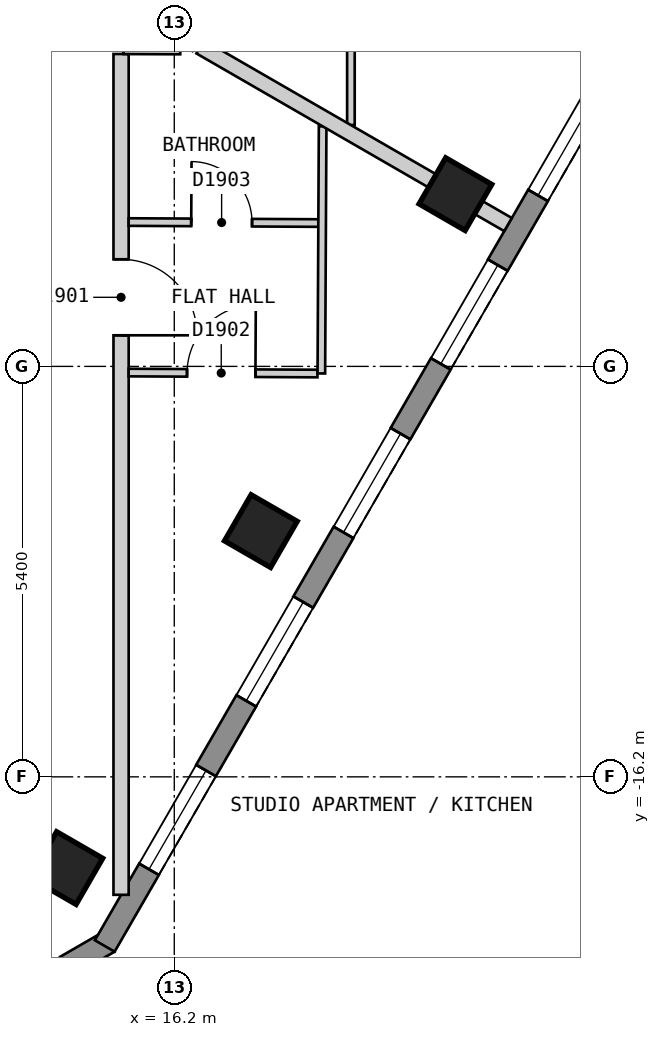
"""IFC4 building model, lengths in metres.
Left out: names, types, materials, properties, quantities, classifications, styles, units other than length and angle.
Written with IfcOpenShell. Run it as: python <this file> out.ifc"""

import sys

from ifc_helpers import new_model, si_unit, direction, frame, frame_2d, origin, origin_2d, place, context, subcontext, project, spatial, polyline, rectangle, outline, extrude, element, fill, save


model = new_model("IFC4")
c1 = context("Model", 3, precision=1e-05, world=origin(), true_north=direction((0.0, 1.0)))
c2 = subcontext(c1, "Body", "Model", "MODEL_VIEW")
j1 = project(units=[si_unit("LENGTHUNIT", "METRE"), si_unit("PLANEANGLEUNIT", "RADIAN")], contexts=[c1])
p1 = place(None, origin())
s1 = spatial("IfcSite", under=j1, at=p1, CompositionType="ELEMENT")
p2 = place(p1, origin())
s2 = spatial("IfcBuilding", under=s1, at=p2, CompositionType="ELEMENT")
p3 = place(p2, frame((0.0, 0.0, 220.8)))
s3 = spatial("IfcBuildingStorey", under=s2, at=p3, CompositionType="ELEMENT", Elevation=220.8)
for number, where, z_axis, x_axis in (
    (1, (14.78, -17.4, 0.0), (0.0, 0.0, 1.0), (0.5, 0.866, 0.0)),
    (2, (17.339, -12.967, 0.0), (0.0, 0.0, 1.0), (0.5, 0.866, 0.0)),
    (3, (19.899, -8.534, 0.0), (0.0, 0.0, 1.0), (0.5, 0.866, 0.0)),
):
    element("IfcColumn", number, at=place(p3, frame(where, z_axis=z_axis, x_axis=x_axis)), inside=s3, PredefinedType="COLUMN", context=c2, shape_type="SweptSolid", body=[
        extrude(rectangle(XDim=0.7, YDim=0.7, at=origin_2d()), origin(), (0.0, 0.0, 1.0), 3.0),
    ])
p4 = place(p3, frame((11.01, -20.87, 0.0), z_axis=(0.0, 0.0, 1.0), x_axis=(0.866022959057, 0.500004234368, 0.0)))
e4 = element("IfcWall", 4, at=p4, inside=s3, PredefinedType="SOLIDWALL", context=c2, shape_type="SweptSolid", body=[
    extrude(outline(polyline([(0.0, -0.15), (5.0, -0.15), (4.92, 0.15), (0.08, 0.15), (0.0, -0.15)])), origin(), (0.0, 0.0, 1.0), 2.7),
])
p5 = place(p4, frame((0.65, 0.0, 0.15)))
e5 = element("IfcOpeningElement", 5, at=p5, cuts=e4, PredefinedType="OPENING", context=c2, shape_type="SweptSolid", body=[
    extrude(rectangle(XDim=1.2, YDim=2.1, at=frame_2d((0.6, 1.05))), frame((0.0, 0.16, 0.0), z_axis=(0.0, -1.0, 0.0), x_axis=(1.0, 0.0, 0.0)), (0.0, 0.0, 1.0), 0.32),
])
p6 = place(p4, frame((3.149, 0.0, 0.15)))
e6 = element("IfcOpeningElement", 6, at=p6, cuts=e4, PredefinedType="OPENING", context=c2, shape_type="SweptSolid", body=[
    extrude(rectangle(XDim=1.2, YDim=2.1, at=frame_2d((0.6, 1.05))), frame((0.0, 0.16, 0.0), z_axis=(0.0, -1.0, 0.0), x_axis=(1.0, 0.0, 0.0)), (0.0, 0.0, 1.0), 0.32),
])
p7 = place(p3, frame((15.285, -18.425, 0.0), z_axis=(0.0, 0.0, 1.0), x_axis=(0.500012653391, 0.866018098222, 0.0)))
e7 = element("IfcWall", 7, at=p7, inside=s3, PredefinedType="SOLIDWALL", context=c2, shape_type="SweptSolid", body=[
    extrude(outline(polyline([(0.0, -0.15), (16.628, -0.15), (16.548, 0.15), (0.08, 0.15), (0.0, -0.15)])), origin(), (0.0, 0.0, 1.0), 2.7),
])
p8 = place(p7, frame((1.165, 0.0, 0.15)))
e8 = element("IfcOpeningElement", 8, at=p8, cuts=e7, PredefinedType="OPENING", context=c2, shape_type="SweptSolid", body=[
    extrude(rectangle(XDim=1.5, YDim=2.1, at=frame_2d((0.75, 1.05))), frame((0.0, 0.16, 0.0), z_axis=(0.0, -1.0, 0.0), x_axis=(1.0, 0.0, 0.0)), (0.0, 0.0, 1.0), 0.32),
])
p9 = place(p7, frame((3.724, 0.0, 0.15)))
e9 = element("IfcOpeningElement", 9, at=p9, cuts=e7, PredefinedType="OPENING", context=c2, shape_type="SweptSolid", body=[
    extrude(rectangle(XDim=1.5, YDim=2.1, at=frame_2d((0.75, 1.05))), frame((0.0, 0.16, 0.0), z_axis=(0.0, -1.0, 0.0), x_axis=(1.0, 0.0, 0.0)), (0.0, 0.0, 1.0), 0.32),
])
p10 = place(p7, frame((6.283, 0.0, 0.15)))
e10 = element("IfcOpeningElement", 10, at=p10, cuts=e7, PredefinedType="OPENING", context=c2, shape_type="SweptSolid", body=[
    extrude(rectangle(XDim=1.5, YDim=2.1, at=frame_2d((0.75, 1.05))), frame((0.0, 0.16, 0.0), z_axis=(0.0, -1.0, 0.0), x_axis=(1.0, 0.0, 0.0)), (0.0, 0.0, 1.0), 0.32),
])
p11 = place(p7, frame((8.843, 0.0, 0.15)))
e11 = element("IfcOpeningElement", 11, at=p11, cuts=e7, PredefinedType="OPENING", context=c2, shape_type="SweptSolid", body=[
    extrude(rectangle(XDim=1.5, YDim=2.1, at=frame_2d((0.75, 1.05))), frame((0.0, 0.16, 0.0), z_axis=(0.0, -1.0, 0.0), x_axis=(1.0, 0.0, 0.0)), (0.0, 0.0, 1.0), 0.32),
])
p12 = place(p7, frame((11.402, 0.0, 0.15)))
e12 = element("IfcOpeningElement", 12, at=p12, cuts=e7, PredefinedType="OPENING", context=c2, shape_type="SweptSolid", body=[
    extrude(rectangle(XDim=1.5, YDim=2.1, at=frame_2d((0.75, 1.05))), frame((0.0, 0.16, 0.0), z_axis=(0.0, -1.0, 0.0), x_axis=(1.0, 0.0, 0.0)), (0.0, 0.0, 1.0), 0.32),
])
p13 = place(p7, frame((13.962, 0.0, 0.15)))
e13 = element("IfcOpeningElement", 13, at=p13, cuts=e7, PredefinedType="OPENING", context=c2, shape_type="SweptSolid", body=[
    extrude(rectangle(XDim=1.5, YDim=2.1, at=frame_2d((0.75, 1.05))), frame((0.0, 0.16, 0.0), z_axis=(0.0, -1.0, 0.0), x_axis=(1.0, 0.0, 0.0)), (0.0, 0.0, 1.0), 0.32),
])
p14 = place(p3, frame((15.5, -17.752, 0.0), z_axis=(0.0, 0.0, 1.0), x_axis=(0.0, 1.0, 0.0)))
e14 = element("IfcWall", 14, at=p14, inside=s3, PredefinedType="PARTITIONING", context=c2, shape_type="SweptSolid", body=[
    extrude(rectangle(XDim=11.062, YDim=0.2, at=frame_2d((5.531, 0.0))), origin(), (0.0, 0.0, 1.0), 2.7),
])
p15 = place(p14, frame((7.361, 0.0, 0.0)))
e15 = element("IfcOpeningElement", 15, at=p15, cuts=e14, PredefinedType="OPENING", context=c2, shape_type="SweptSolid", body=[
    extrude(rectangle(XDim=1.0, YDim=2.1, at=frame_2d((0.5, 1.05))), frame((0.0, 0.11, 0.0), z_axis=(0.0, -1.0, 0.0), x_axis=(1.0, 0.0, 0.0)), (0.0, 0.0, 1.0), 0.22),
])
p16 = place(p3, frame((15.6, -8.901, 0.0), z_axis=(0.0, 0.0, 1.0), x_axis=(0.999986038514, -0.005284200615, 0.0)))
e16 = element("IfcWall", 16, at=p16, inside=s3, PredefinedType="PARTITIONING", context=c2, shape_type="SweptSolid", body=[
    extrude(rectangle(XDim=2.495, YDim=0.1, at=frame_2d((1.248, 0.0))), origin(), (0.0, 0.0, 1.0), 2.7),
])
p17 = place(p16, frame((0.823, 0.0, 0.0)))
e17 = element("IfcOpeningElement", 17, at=p17, cuts=e16, PredefinedType="OPENING", context=c2, shape_type="SweptSolid", body=[
    extrude(rectangle(XDim=0.8, YDim=2.1, at=frame_2d((0.4, 1.05))), frame((0.0, 0.06, 0.0), z_axis=(0.0, -1.0, 0.0), x_axis=(1.0, 0.0, 0.0)), (0.0, 0.0, 1.0), 0.12),
])
p18 = place(p3, frame((15.6, -10.881, 0.0), z_axis=(0.0, 0.0, 1.0), x_axis=(0.999986431575, -0.005209286502, 0.0)))
e18 = element("IfcWall", 18, at=p18, inside=s3, PredefinedType="PARTITIONING", context=c2, shape_type="SweptSolid", body=[
    extrude(rectangle(XDim=2.484, YDim=0.1, at=frame_2d((1.242, 0.0))), origin(), (0.0, 0.0, 1.0), 2.7),
])
p19 = place(p18, frame((0.768, 0.0, 0.0)))
e19 = element("IfcOpeningElement", 19, at=p19, cuts=e18, PredefinedType="OPENING", context=c2, shape_type="SweptSolid", body=[
    extrude(rectangle(XDim=0.9, YDim=2.1, at=frame_2d((0.45, 1.05))), frame((0.0, 0.06, 0.0), z_axis=(0.0, -1.0, 0.0), x_axis=(1.0, 0.0, 0.0)), (0.0, 0.0, 1.0), 0.12),
])
p20 = place(p3, frame((18.135, -10.893, 0.0), z_axis=(0.0, 0.0, 1.0), x_axis=(0.005255182688, 0.999986191432, 0.0)))
e20 = element("IfcWall", 20, at=p20, inside=s3, PredefinedType="PARTITIONING", context=c2, shape_type="SweptSolid", body=[
    extrude(rectangle(XDim=3.252, YDim=0.1, at=frame_2d((1.626, 0.0))), origin(), (0.0, 0.0, 1.0), 2.7),
])
p21 = place(p3, frame((18.524, -7.625, 0.0), z_axis=(0.0, 0.0, 1.0), x_axis=(0.0, 1.0, 0.0)))
e21 = element("IfcWall", 21, at=p21, inside=s3, PredefinedType="PARTITIONING", context=c2, shape_type="SweptSolid", body=[
    extrude(rectangle(XDim=3.089, YDim=0.1, at=frame_2d((1.544, 0.0))), origin(), (0.0, 0.0, 1.0), 2.7),
])
p22 = place(p3, frame((15.53, -6.591, 0.0), z_axis=(0.0, 0.0, 1.0), x_axis=(0.999992350786, -0.003911312976, 0.0)))
e22 = element("IfcWall", 22, at=p22, inside=s3, PredefinedType="PARTITIONING", context=c2, shape_type="SweptSolid", body=[
    extrude(rectangle(XDim=0.749, YDim=0.2, at=frame_2d((0.375, 0.0))), origin(), (0.0, 0.0, 1.0), 2.7),
])
p23 = place(p3, frame((16.541, -6.596, 0.0), z_axis=(0.0, 0.0, 1.0), x_axis=(0.866040404911, -0.499974016386, 0.0)))
e23 = element("IfcWall", 23, at=p23, inside=s3, PredefinedType="PARTITIONING", context=c2, shape_type="SweptSolid", body=[
    extrude(rectangle(XDim=4.677, YDim=0.2, at=frame_2d((2.338, 0.0))), origin(), (0.0, 0.0, 1.0), 2.7),
])
p24 = place(p8, origin())
e24 = element("IfcWindow", 24, at=p24, inside=s3, PartitioningType="SINGLE_PANEL", PredefinedType="WINDOW", context=c2, shape_type="SweptSolid", body=[
    extrude(rectangle(XDim=1.5, YDim=2.1, at=frame_2d((0.75, 1.05))), frame((0.0, 0.03, 0.0), z_axis=(0.0, -1.0, 0.0), x_axis=(1.0, 0.0, 0.0)), (0.0, 0.0, 1.0), 0.06),
])
fill(e8, e24)
p25 = place(p9, origin())
e25 = element("IfcWindow", 25, at=p25, inside=s3, PartitioningType="SINGLE_PANEL", PredefinedType="WINDOW", context=c2, shape_type="SweptSolid", body=[
    extrude(rectangle(XDim=1.5, YDim=2.1, at=frame_2d((0.75, 1.05))), frame((0.0, 0.03, 0.0), z_axis=(0.0, -1.0, 0.0), x_axis=(1.0, 0.0, 0.0)), (0.0, 0.0, 1.0), 0.06),
])
fill(e9, e25)
p26 = place(p10, origin())
e26 = element("IfcWindow", 26, at=p26, inside=s3, PartitioningType="SINGLE_PANEL", PredefinedType="WINDOW", context=c2, shape_type="SweptSolid", body=[
    extrude(rectangle(XDim=1.5, YDim=2.1, at=frame_2d((0.75, 1.05))), frame((0.0, 0.03, 0.0), z_axis=(0.0, -1.0, 0.0), x_axis=(1.0, 0.0, 0.0)), (0.0, 0.0, 1.0), 0.06),
])
fill(e10, e26)
p27 = place(p11, origin())
e27 = element("IfcWindow", 27, at=p27, inside=s3, PartitioningType="SINGLE_PANEL", PredefinedType="WINDOW", context=c2, shape_type="SweptSolid", body=[
    extrude(rectangle(XDim=1.5, YDim=2.1, at=frame_2d((0.75, 1.05))), frame((0.0, 0.03, 0.0), z_axis=(0.0, -1.0, 0.0), x_axis=(1.0, 0.0, 0.0)), (0.0, 0.0, 1.0), 0.06),
])
fill(e11, e27)
p28 = place(p12, origin())
e28 = element("IfcWindow", 28, at=p28, inside=s3, PartitioningType="SINGLE_PANEL", PredefinedType="WINDOW", context=c2, shape_type="SweptSolid", body=[
    extrude(rectangle(XDim=1.5, YDim=2.1, at=frame_2d((0.75, 1.05))), frame((0.0, 0.03, 0.0), z_axis=(0.0, -1.0, 0.0), x_axis=(1.0, 0.0, 0.0)), (0.0, 0.0, 1.0), 0.06),
])
fill(e12, e28)
p29 = place(p15, origin())
e29 = element("IfcDoor", 29, at=p29, inside=s3, OperationType="SINGLE_SWING_LEFT", PredefinedType="DOOR", context=c2, shape_type="SweptSolid", body=[
    extrude(rectangle(XDim=1.0, YDim=2.1, at=frame_2d((0.5, 1.05))), frame((0.0, 0.025, 0.0), z_axis=(0.0, -1.0, 0.0), x_axis=(1.0, 0.0, 0.0)), (0.0, 0.0, 1.0), 0.05),
])
fill(e15, e29)
p30 = place(p19, origin())
e30 = element("IfcDoor", 30, at=p30, inside=s3, OperationType="SINGLE_SWING_RIGHT", PredefinedType="DOOR", context=c2, shape_type="SweptSolid", body=[
    extrude(rectangle(XDim=0.9, YDim=2.1, at=frame_2d((0.45, 1.05))), frame((0.0, 0.025, 0.0), z_axis=(0.0, -1.0, 0.0), x_axis=(1.0, 0.0, 0.0)), (0.0, 0.0, 1.0), 0.05),
])
fill(e19, e30)
p31 = place(p17, origin())
e31 = element("IfcDoor", 31, at=p31, inside=s3, OperationType="SINGLE_SWING_LEFT", PredefinedType="DOOR", context=c2, shape_type="SweptSolid", body=[
    extrude(rectangle(XDim=0.8, YDim=2.1, at=frame_2d((0.4, 1.05))), frame((0.0, 0.025, 0.0), z_axis=(0.0, -1.0, 0.0), x_axis=(1.0, 0.0, 0.0)), (0.0, 0.0, 1.0), 0.05),
])
fill(e17, e31)
save(model, sys.argv[1])
